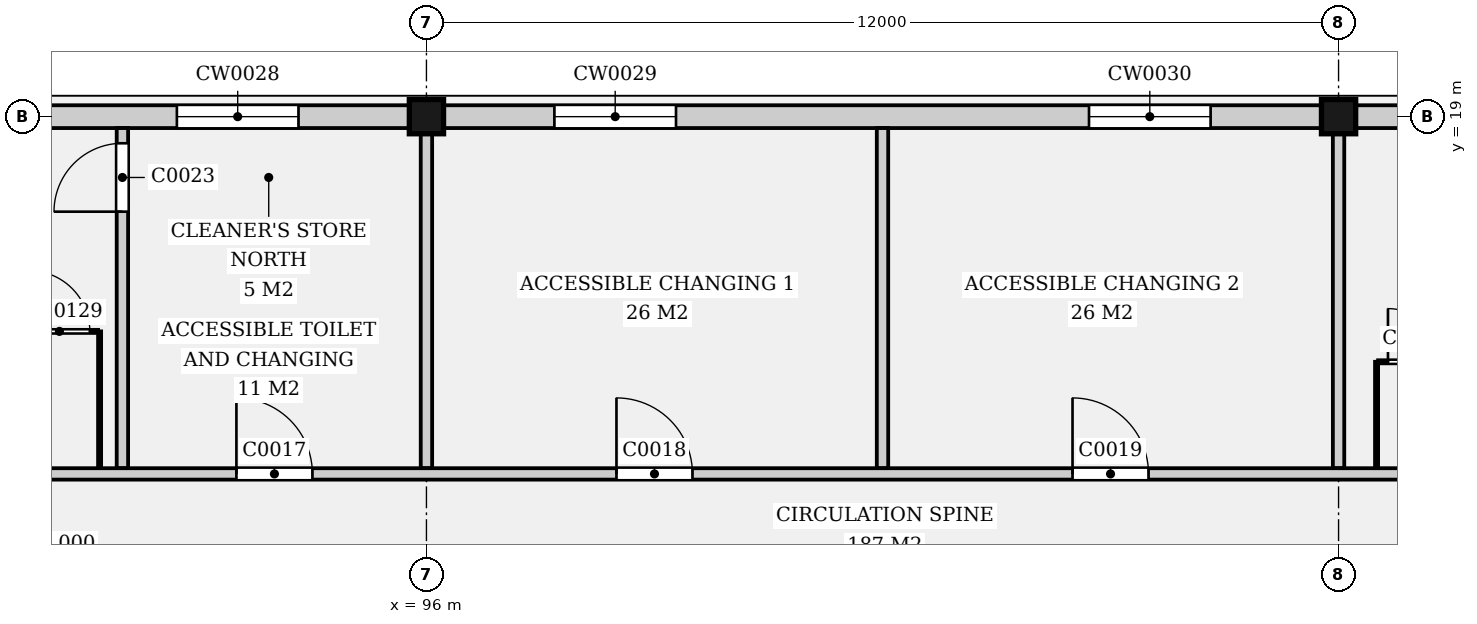
"""IFC4 building model, lengths in metres.
Left out: names, types, materials, properties, quantities, classifications, styles, units other than length and angle.
Written with IfcOpenShell. Run it as: python <this file> out.ifc"""

import sys

from ifc_helpers import new_model, si_unit, direction, frame, frame_2d, origin, origin_2d, place, context, subcontext, project, spatial, rectangle, extrude, element, fill, save


model = new_model("IFC4")
c1 = context("Model", 3, precision=1e-05, world=origin(), true_north=direction((0.0, 1.0)))
c2 = subcontext(c1, "Body", "Model", "MODEL_VIEW")
j1 = project(units=[si_unit("LENGTHUNIT", "METRE"), si_unit("PLANEANGLEUNIT", "RADIAN")], contexts=[c1])
p1 = place(None, origin())
s1 = spatial("IfcSite", under=j1, at=p1, CompositionType="ELEMENT")
p2 = place(p1, origin())
s2 = spatial("IfcBuilding", under=s1, at=p2, CompositionType="ELEMENT")
p3 = place(p2, origin())
s3 = spatial("IfcBuildingStorey", under=s2, at=p3, CompositionType="ELEMENT", Elevation=0.0)
for number, where, z_axis, x_axis in (
    (1, (96.0, 19.0, -0.25), (0.0, 0.0, 1.0), (1.0, 0.0, 0.0)),
    (2, (108.0, 19.0, -0.25), (0.0, 0.0, 1.0), (1.0, 0.0, 0.0)),
):
    element("IfcColumn", number, at=place(p3, frame(where, z_axis=z_axis, x_axis=x_axis)), inside=s3, PredefinedType="COLUMN", context=c2, shape_type="SweptSolid", body=[
        extrude(rectangle(XDim=0.45, YDim=0.45, at=origin_2d()), origin(), (0.0, 0.0, 1.0), 5.25),
    ])
p4 = place(p3, frame((84.225, 19.0, 0.0), z_axis=(0.0, 0.0, 1.0), x_axis=(1.0, 0.0, 0.0)))
e3 = element("IfcWall", 3, at=p4, inside=s3, PredefinedType="ELEMENTEDWALL", context=c2, shape_type="SweptSolid", body=[
    extrude(rectangle(XDim=11.55, YDim=0.3, at=frame_2d((5.775, 0.0))), origin(), (0.0, 0.0, 1.0), 4.6),
])
p5 = place(p4, frame((1.458, 0.0, 2.5)))
e4 = element("IfcOpeningElement", 4, at=p5, cuts=e3, PredefinedType="OPENING", context=c2, shape_type="SweptSolid", body=[
    extrude(rectangle(XDim=1.6, YDim=1.0, at=frame_2d((0.8, 0.5))), frame((0.0, 0.16, 0.0), z_axis=(0.0, -1.0, 0.0), x_axis=(1.0, 0.0, 0.0)), (0.0, 0.0, 1.0), 0.32),
])
p6 = place(p4, frame((4.975, 0.0, 2.5)))
e5 = element("IfcOpeningElement", 5, at=p6, cuts=e3, PredefinedType="OPENING", context=c2, shape_type="SweptSolid", body=[
    extrude(rectangle(XDim=1.6, YDim=1.0, at=frame_2d((0.8, 0.5))), frame((0.0, 0.16, 0.0), z_axis=(0.0, -1.0, 0.0), x_axis=(1.0, 0.0, 0.0)), (0.0, 0.0, 1.0), 0.32),
])
p7 = place(p4, frame((8.492, 0.0, 2.5)))
e6 = element("IfcOpeningElement", 6, at=p7, cuts=e3, PredefinedType="OPENING", context=c2, shape_type="SweptSolid", body=[
    extrude(rectangle(XDim=1.6, YDim=1.0, at=frame_2d((0.8, 0.5))), frame((0.0, 0.16, 0.0), z_axis=(0.0, -1.0, 0.0), x_axis=(1.0, 0.0, 0.0)), (0.0, 0.0, 1.0), 0.32),
])
p8 = place(p3, frame((96.225, 19.0, 0.0), z_axis=(0.0, 0.0, 1.0), x_axis=(1.0, 0.0, 0.0)))
e7 = element("IfcWall", 7, at=p8, inside=s3, PredefinedType="ELEMENTEDWALL", context=c2, shape_type="SweptSolid", body=[
    extrude(rectangle(XDim=11.55, YDim=0.3, at=frame_2d((5.775, 0.0))), origin(), (0.0, 0.0, 1.0), 4.6),
])
p9 = place(p8, frame((1.458, 0.0, 2.5)))
e8 = element("IfcOpeningElement", 8, at=p9, cuts=e7, PredefinedType="OPENING", context=c2, shape_type="SweptSolid", body=[
    extrude(rectangle(XDim=1.6, YDim=1.0, at=frame_2d((0.8, 0.5))), frame((0.0, 0.16, 0.0), z_axis=(0.0, -1.0, 0.0), x_axis=(1.0, 0.0, 0.0)), (0.0, 0.0, 1.0), 0.32),
])
p10 = place(p8, frame((8.492, 0.0, 2.5)))
e9 = element("IfcOpeningElement", 9, at=p10, cuts=e7, PredefinedType="OPENING", context=c2, shape_type="SweptSolid", body=[
    extrude(rectangle(XDim=1.6, YDim=1.0, at=frame_2d((0.8, 0.5))), frame((0.0, 0.16, 0.0), z_axis=(0.0, -1.0, 0.0), x_axis=(1.0, 0.0, 0.0)), (0.0, 0.0, 1.0), 0.32),
])
p11 = place(p3, frame((108.225, 19.0, 0.0), z_axis=(0.0, 0.0, 1.0), x_axis=(1.0, 0.0, 0.0)))
e10 = element("IfcWall", 10, at=p11, inside=s3, PredefinedType="ELEMENTEDWALL", context=c2, shape_type="SweptSolid", body=[
    extrude(rectangle(XDim=11.55, YDim=0.3, at=frame_2d((5.775, 0.0))), origin(), (0.0, 0.0, 1.0), 4.6),
])
p12 = place(p11, frame((1.458, 0.0, 2.5)))
e11 = element("IfcOpeningElement", 11, at=p12, cuts=e10, PredefinedType="OPENING", context=c2, shape_type="SweptSolid", body=[
    extrude(rectangle(XDim=1.6, YDim=1.0, at=frame_2d((0.8, 0.5))), frame((0.0, 0.16, 0.0), z_axis=(0.0, -1.0, 0.0), x_axis=(1.0, 0.0, 0.0)), (0.0, 0.0, 1.0), 0.32),
])
p13 = place(p11, frame((8.492, 0.0, 2.5)))
e12 = element("IfcOpeningElement", 12, at=p13, cuts=e10, PredefinedType="OPENING", context=c2, shape_type="SweptSolid", body=[
    extrude(rectangle(XDim=1.6, YDim=1.0, at=frame_2d((0.8, 0.5))), frame((0.0, 0.16, 0.0), z_axis=(0.0, -1.0, 0.0), x_axis=(1.0, 0.0, 0.0)), (0.0, 0.0, 1.0), 0.32),
])
p14 = place(p11, frame((3.875, 0.0, 0.0)))
e13 = element("IfcOpeningElement", 13, at=p14, cuts=e10, PredefinedType="OPENING", context=c2, shape_type="SweptSolid", body=[
    extrude(rectangle(XDim=1.8, YDim=2.4, at=frame_2d((0.9, 1.2))), frame((0.0, 0.16, 0.0), z_axis=(0.0, -1.0, 0.0), x_axis=(1.0, 0.0, 0.0)), (0.0, 0.0, 1.0), 0.32),
])
p15 = place(p3, frame((55.3, 14.3, 0.0), z_axis=(0.0, 0.0, 1.0), x_axis=(1.0, 0.0, 0.0)))
e14 = element("IfcWall", 14, at=p15, inside=s3, PredefinedType="PARTITIONING", context=c2, shape_type="SweptSolid", body=[
    extrude(rectangle(XDim=93.4, YDim=0.15, at=frame_2d((46.7, 0.0))), origin(), (0.0, 0.0, 1.0), 4.6),
])
p16 = place(p15, frame((15.8, 0.0, 0.0)))
e15 = element("IfcOpeningElement", 15, at=p16, cuts=e14, PredefinedType="OPENING", context=c2, shape_type="SweptSolid", body=[
    extrude(rectangle(XDim=1.8, YDim=2.4, at=frame_2d((0.9, 1.2))), frame((0.0, 0.085, 0.0), z_axis=(0.0, -1.0, 0.0), x_axis=(1.0, 0.0, 0.0)), (0.0, 0.0, 1.0), 0.17),
])
p17 = place(p15, frame((32.2, 0.0, 0.0)))
e16 = element("IfcOpeningElement", 16, at=p17, cuts=e14, PredefinedType="OPENING", context=c2, shape_type="SweptSolid", body=[
    extrude(rectangle(XDim=1.0, YDim=2.1, at=frame_2d((0.5, 1.05))), frame((0.0, 0.085, 0.0), z_axis=(0.0, -1.0, 0.0), x_axis=(1.0, 0.0, 0.0)), (0.0, 0.0, 1.0), 0.17),
])
p18 = place(p15, frame((38.2, 0.0, 0.0)))
e17 = element("IfcOpeningElement", 17, at=p18, cuts=e14, PredefinedType="OPENING", context=c2, shape_type="SweptSolid", body=[
    extrude(rectangle(XDim=1.0, YDim=2.1, at=frame_2d((0.5, 1.05))), frame((0.0, 0.085, 0.0), z_axis=(0.0, -1.0, 0.0), x_axis=(1.0, 0.0, 0.0)), (0.0, 0.0, 1.0), 0.17),
])
p19 = place(p15, frame((43.2, 0.0, 0.0)))
e18 = element("IfcOpeningElement", 18, at=p19, cuts=e14, PredefinedType="OPENING", context=c2, shape_type="SweptSolid", body=[
    extrude(rectangle(XDim=1.0, YDim=2.1, at=frame_2d((0.5, 1.05))), frame((0.0, 0.085, 0.0), z_axis=(0.0, -1.0, 0.0), x_axis=(1.0, 0.0, 0.0)), (0.0, 0.0, 1.0), 0.17),
])
p20 = place(p15, frame((49.2, 0.0, 0.0)))
e19 = element("IfcOpeningElement", 19, at=p20, cuts=e14, PredefinedType="OPENING", context=c2, shape_type="SweptSolid", body=[
    extrude(rectangle(XDim=1.0, YDim=2.1, at=frame_2d((0.5, 1.05))), frame((0.0, 0.085, 0.0), z_axis=(0.0, -1.0, 0.0), x_axis=(1.0, 0.0, 0.0)), (0.0, 0.0, 1.0), 0.17),
])
p21 = place(p15, frame((57.8, 0.0, 0.0)))
e20 = element("IfcOpeningElement", 20, at=p21, cuts=e14, PredefinedType="OPENING", context=c2, shape_type="SweptSolid", body=[
    extrude(rectangle(XDim=1.8, YDim=2.4, at=frame_2d((0.9, 1.2))), frame((0.0, 0.085, 0.0), z_axis=(0.0, -1.0, 0.0), x_axis=(1.0, 0.0, 0.0)), (0.0, 0.0, 1.0), 0.17),
])
p22 = place(p15, frame((69.8, 0.0, 0.0)))
e21 = element("IfcOpeningElement", 21, at=p22, cuts=e14, PredefinedType="OPENING", context=c2, shape_type="SweptSolid", body=[
    extrude(rectangle(XDim=1.8, YDim=2.4, at=frame_2d((0.9, 1.2))), frame((0.0, 0.085, 0.0), z_axis=(0.0, -1.0, 0.0), x_axis=(1.0, 0.0, 0.0)), (0.0, 0.0, 1.0), 0.17),
])
p23 = place(p15, frame((82.2, 0.0, 0.0)))
e22 = element("IfcOpeningElement", 22, at=p23, cuts=e14, PredefinedType="OPENING", context=c2, shape_type="SweptSolid", body=[
    extrude(rectangle(XDim=1.0, YDim=2.1, at=frame_2d((0.5, 1.05))), frame((0.0, 0.085, 0.0), z_axis=(0.0, -1.0, 0.0), x_axis=(1.0, 0.0, 0.0)), (0.0, 0.0, 1.0), 0.17),
])
p24 = place(p3, frame((92.0, 14.375, 0.0), z_axis=(0.0, 0.0, 1.0), x_axis=(0.0, 1.0, 0.0)))
e23 = element("IfcWall", 23, at=p24, inside=s3, PredefinedType="PARTITIONING", context=c2, shape_type="SweptSolid", body=[
    extrude(rectangle(XDim=4.475, YDim=0.15, at=frame_2d((2.238, 0.0))), origin(), (0.0, 0.0, 1.0), 4.6),
])
p25 = place(p24, frame((3.375, 0.0, 0.0)))
e24 = element("IfcOpeningElement", 24, at=p25, cuts=e23, PredefinedType="OPENING", context=c2, shape_type="SweptSolid", body=[
    extrude(rectangle(XDim=0.9, YDim=2.1, at=frame_2d((0.45, 1.05))), frame((0.0, 0.085, 0.0), z_axis=(0.0, -1.0, 0.0), x_axis=(1.0, 0.0, 0.0)), (0.0, 0.0, 1.0), 0.17),
])
p26 = place(p3, frame((96.0, 14.375, 0.0), z_axis=(0.0, 0.0, 1.0), x_axis=(0.0, 1.0, 0.0)))
e25 = element("IfcWall", 25, at=p26, inside=s3, PredefinedType="PARTITIONING", context=c2, shape_type="SweptSolid", body=[
    extrude(rectangle(XDim=4.4, YDim=0.15, at=frame_2d((2.2, 0.0))), origin(), (0.0, 0.0, 1.0), 4.6),
])
p27 = place(p3, frame((102.0, 14.375, 0.0), z_axis=(0.0, 0.0, 1.0), x_axis=(0.0, 1.0, 0.0)))
e26 = element("IfcWall", 26, at=p27, inside=s3, PredefinedType="PARTITIONING", context=c2, shape_type="SweptSolid", body=[
    extrude(rectangle(XDim=4.475, YDim=0.15, at=frame_2d((2.238, 0.0))), origin(), (0.0, 0.0, 1.0), 4.6),
])
p28 = place(p3, frame((108.0, 14.375, 0.0), z_axis=(0.0, 0.0, 1.0), x_axis=(0.0, 1.0, 0.0)))
e27 = element("IfcWall", 27, at=p28, inside=s3, PredefinedType="PARTITIONING", context=c2, shape_type="SweptSolid", body=[
    extrude(rectangle(XDim=4.4, YDim=0.15, at=frame_2d((2.2, 0.0))), origin(), (0.0, 0.0, 1.0), 4.6),
])
p29 = place(p3, frame((91.7, 14.375, 0.0), z_axis=(0.0, 0.0, 1.0), x_axis=(0.0, 1.0, 0.0)))
e28 = element("IfcWall", 28, at=p29, inside=s3, PredefinedType="PARTITIONING", context=c2, shape_type="SweptSolid", body=[
    extrude(rectangle(XDim=1.8, YDim=0.04, at=frame_2d((0.9, 0.0))), origin(), (0.0, 0.0, 1.0), 2.4),
])
p30 = place(p3, frame((90.663, 16.175, 0.0), z_axis=(0.0, 0.0, 1.0), x_axis=(1.0, 0.0, 0.0)))
e29 = element("IfcWall", 29, at=p30, inside=s3, PredefinedType="PARTITIONING", context=c2, shape_type="SweptSolid", body=[
    extrude(rectangle(XDim=1.017, YDim=0.04, at=frame_2d((0.509, 0.0))), origin(), (0.0, 0.0, 1.0), 2.4),
])
p31 = place(p30, frame((0.109, 0.0, 0.0)))
e30 = element("IfcOpeningElement", 30, at=p31, cuts=e29, PredefinedType="OPENING", context=c2, shape_type="SweptSolid", body=[
    extrude(rectangle(XDim=0.8, YDim=2.0, at=frame_2d((0.4, 1.0))), frame((0.0, 0.03, 0.0), z_axis=(0.0, -1.0, 0.0), x_axis=(1.0, 0.0, 0.0)), (0.0, 0.0, 1.0), 0.06),
])
p32 = place(p3, frame((108.5, 14.375, 0.0), z_axis=(0.0, 0.0, 1.0), x_axis=(0.0, 1.0, 0.0)))
e31 = element("IfcWall", 31, at=p32, inside=s3, PredefinedType="PARTITIONING", context=c2, shape_type="SweptSolid", body=[
    extrude(rectangle(XDim=1.4, YDim=0.04, at=frame_2d((0.7, 0.0))), origin(), (0.0, 0.0, 1.0), 2.4),
])
p33 = place(p3, frame((108.52, 15.775, 0.0), z_axis=(0.0, 0.0, 1.0), x_axis=(1.0, 0.0, 0.0)))
e32 = element("IfcWall", 32, at=p33, inside=s3, PredefinedType="PARTITIONING", context=c2, shape_type="SweptSolid", body=[
    extrude(rectangle(XDim=0.96, YDim=0.04, at=frame_2d((0.48, 0.0))), origin(), (0.0, 0.0, 1.0), 2.4),
])
p34 = place(p33, frame((0.13, 0.0, 0.0)))
e33 = element("IfcOpeningElement", 33, at=p34, cuts=e32, PredefinedType="OPENING", context=c2, shape_type="SweptSolid", body=[
    extrude(rectangle(XDim=0.7, YDim=2.0, at=frame_2d((0.35, 1.0))), frame((0.0, 0.03, 0.0), z_axis=(0.0, -1.0, 0.0), x_axis=(1.0, 0.0, 0.0)), (0.0, 0.0, 1.0), 0.06),
])
p35 = place(p7, origin())
e34 = element("IfcWindow", 34, at=p35, inside=s3, PartitioningType="SINGLE_PANEL", PredefinedType="WINDOW", context=c2, shape_type="SweptSolid", body=[
    extrude(rectangle(XDim=1.6, YDim=1.0, at=frame_2d((0.8, 0.5))), frame((0.0, 0.03, 0.0), z_axis=(0.0, -1.0, 0.0), x_axis=(1.0, 0.0, 0.0)), (0.0, 0.0, 1.0), 0.06),
])
fill(e6, e34)
p36 = place(p9, origin())
e35 = element("IfcWindow", 35, at=p36, inside=s3, PartitioningType="SINGLE_PANEL", PredefinedType="WINDOW", context=c2, shape_type="SweptSolid", body=[
    extrude(rectangle(XDim=1.6, YDim=1.0, at=frame_2d((0.8, 0.5))), frame((0.0, 0.03, 0.0), z_axis=(0.0, -1.0, 0.0), x_axis=(1.0, 0.0, 0.0)), (0.0, 0.0, 1.0), 0.06),
])
fill(e8, e35)
p37 = place(p10, origin())
e36 = element("IfcWindow", 36, at=p37, inside=s3, PartitioningType="SINGLE_PANEL", PredefinedType="WINDOW", context=c2, shape_type="SweptSolid", body=[
    extrude(rectangle(XDim=1.6, YDim=1.0, at=frame_2d((0.8, 0.5))), frame((0.0, 0.03, 0.0), z_axis=(0.0, -1.0, 0.0), x_axis=(1.0, 0.0, 0.0)), (0.0, 0.0, 1.0), 0.06),
])
fill(e9, e36)
p38 = place(p18, origin())
e37 = element("IfcDoor", 37, at=p38, inside=s3, OperationType="SINGLE_SWING_LEFT", PredefinedType="DOOR", context=c2, shape_type="SweptSolid", body=[
    extrude(rectangle(XDim=1.0, YDim=2.1, at=frame_2d((0.5, 1.05))), frame((0.0, 0.025, 0.0), z_axis=(0.0, -1.0, 0.0), x_axis=(1.0, 0.0, 0.0)), (0.0, 0.0, 1.0), 0.05),
])
fill(e17, e37)
p39 = place(p19, origin())
e38 = element("IfcDoor", 38, at=p39, inside=s3, OperationType="SINGLE_SWING_LEFT", PredefinedType="DOOR", context=c2, shape_type="SweptSolid", body=[
    extrude(rectangle(XDim=1.0, YDim=2.1, at=frame_2d((0.5, 1.05))), frame((0.0, 0.025, 0.0), z_axis=(0.0, -1.0, 0.0), x_axis=(1.0, 0.0, 0.0)), (0.0, 0.0, 1.0), 0.05),
])
fill(e18, e38)
p40 = place(p20, origin())
e39 = element("IfcDoor", 39, at=p40, inside=s3, OperationType="SINGLE_SWING_LEFT", PredefinedType="DOOR", context=c2, shape_type="SweptSolid", body=[
    extrude(rectangle(XDim=1.0, YDim=2.1, at=frame_2d((0.5, 1.05))), frame((0.0, 0.025, 0.0), z_axis=(0.0, -1.0, 0.0), x_axis=(1.0, 0.0, 0.0)), (0.0, 0.0, 1.0), 0.05),
])
fill(e19, e39)
p41 = place(p25, origin())
e40 = element("IfcDoor", 40, at=p41, inside=s3, OperationType="SINGLE_SWING_LEFT", PredefinedType="DOOR", context=c2, shape_type="SweptSolid", body=[
    extrude(rectangle(XDim=0.9, YDim=2.1, at=frame_2d((0.45, 1.05))), frame((0.0, 0.025, 0.0), z_axis=(0.0, -1.0, 0.0), x_axis=(1.0, 0.0, 0.0)), (0.0, 0.0, 1.0), 0.05),
])
fill(e24, e40)
p42 = place(p31, origin())
e41 = element("IfcDoor", 41, at=p42, inside=s3, OperationType="SINGLE_SWING_LEFT", PredefinedType="DOOR", context=c2, shape_type="SweptSolid", body=[
    extrude(rectangle(XDim=0.8, YDim=2.0, at=frame_2d((0.4, 1.0))), frame((0.0, 0.02, 0.0), z_axis=(0.0, -1.0, 0.0), x_axis=(1.0, 0.0, 0.0)), (0.0, 0.0, 1.0), 0.04),
])
fill(e30, e41)
p43 = place(p34, origin())
e42 = element("IfcDoor", 42, at=p43, inside=s3, OperationType="SINGLE_SWING_LEFT", PredefinedType="DOOR", context=c2, shape_type="SweptSolid", body=[
    extrude(rectangle(XDim=0.7, YDim=2.0, at=frame_2d((0.35, 1.0))), frame((0.0, 0.02, 0.0), z_axis=(0.0, -1.0, 0.0), x_axis=(1.0, 0.0, 0.0)), (0.0, 0.0, 1.0), 0.04),
])
fill(e33, e42)
save(model, sys.argv[1])
